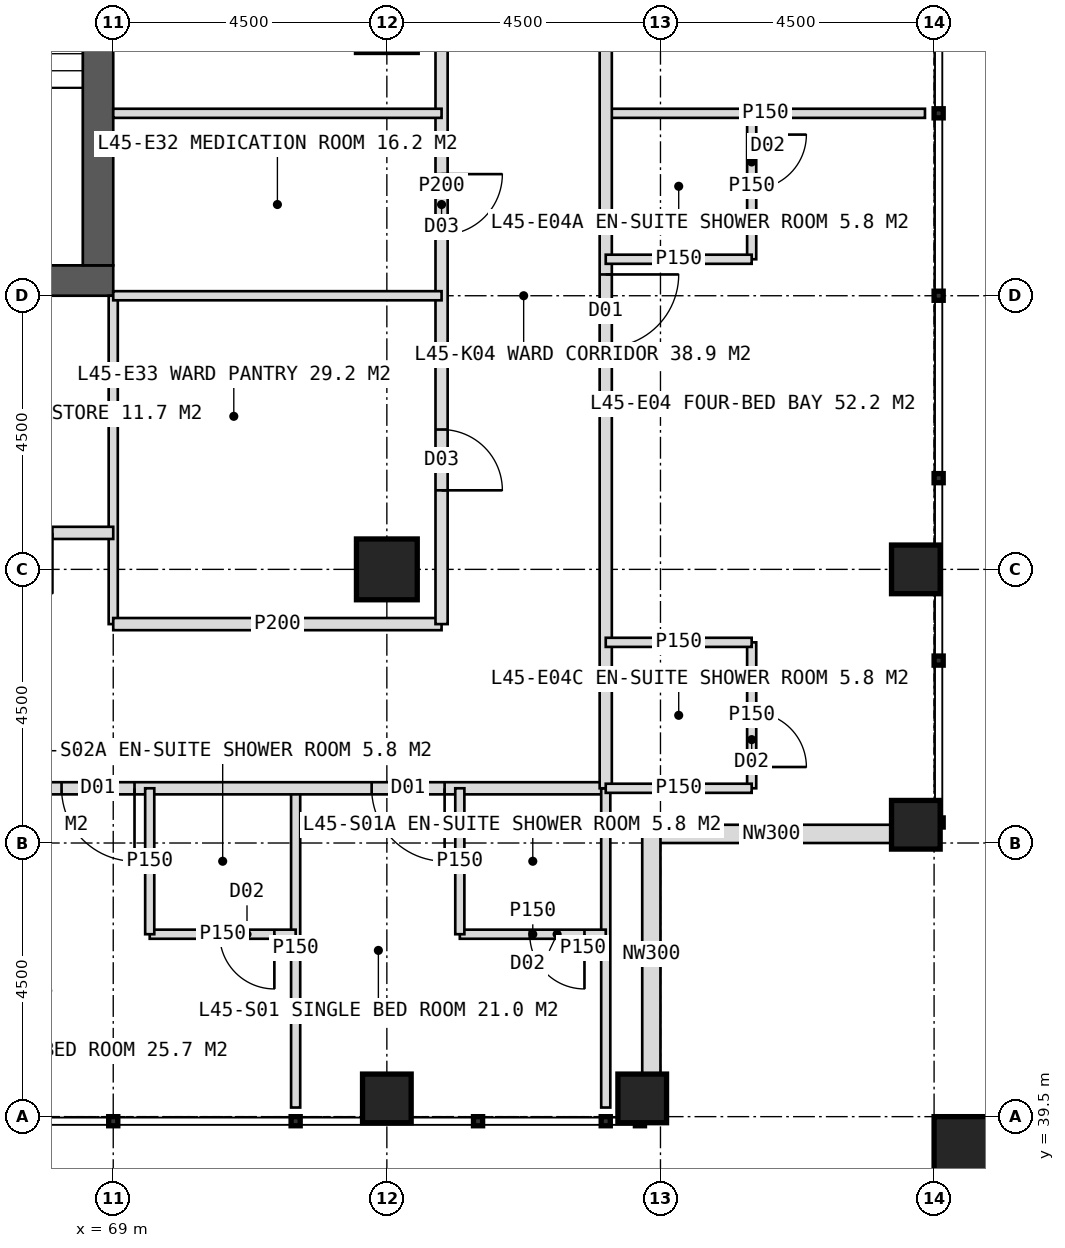
"""IFC4 building model, lengths in metres.
Left out: names, types, materials, properties, quantities, classifications, styles, units other than length and angle.
Written with IfcOpenShell. Run it as: python <this file> out.ifc"""

import sys

from ifc_helpers import new_model, si_unit, direction, frame, frame_2d, origin, origin_2d, place, context, subcontext, project, spatial, rectangle, hollow_rectangle, extrude, element, fill, save


model = new_model("IFC4")
c1 = context("Model", 3, precision=1e-05, world=origin(), true_north=direction((0.0, 1.0)))
c2 = subcontext(c1, "Body", "Model", "MODEL_VIEW")
j1 = project(units=[si_unit("LENGTHUNIT", "METRE"), si_unit("PLANEANGLEUNIT", "RADIAN")], contexts=[c1])
p1 = place(None, origin())
s1 = spatial("IfcSite", under=j1, at=p1, CompositionType="ELEMENT")
p2 = place(p1, origin())
s2 = spatial("IfcBuilding", under=s1, at=p2, CompositionType="ELEMENT")
p3 = place(p2, frame((0.0, 0.0, 189.0)))
s3 = spatial("IfcBuildingStorey", under=s2, at=p3, CompositionType="ELEMENT", Elevation=189.0)
p4 = place(p3, frame((51.0, 53.25, 0.0), z_axis=(0.0, 0.0, 1.0), x_axis=(1.0, 0.0, 0.0)))
e1 = element("IfcWall", 1, at=p4, inside=s3, PredefinedType="SHEAR", context=c2, shape_type="SweptSolid", body=[
    extrude(rectangle(XDim=18.0, YDim=0.5, at=frame_2d((9.0, 0.0))), origin(), (0.0, 0.0, 1.0), 4.0),
])
p5 = place(p4, frame((8.1, 0.0, 0.0)))
e2 = element("IfcOpeningElement", 2, at=p5, cuts=e1, PredefinedType="OPENING", context=c2, shape_type="SweptSolid", body=[
    extrude(rectangle(XDim=1.8, YDim=2.2, at=frame_2d((0.9, 1.1))), frame((0.0, 0.26, 0.0), z_axis=(0.0, -1.0, 0.0), x_axis=(1.0, 0.0, 0.0)), (0.0, 0.0, 1.0), 0.52),
])
p6 = place(p3, frame((68.75, 53.5, 0.0), z_axis=(0.0, 0.0, 1.0), x_axis=(0.0, 1.0, 0.0)))
e3 = element("IfcWall", 3, at=p6, inside=s3, PredefinedType="SHEAR", context=c2, shape_type="SweptSolid", body=[
    extrude(rectangle(XDim=17.0, YDim=0.5, at=frame_2d((8.5, 0.0))), origin(), (0.0, 0.0, 1.0), 4.0),
])
p7 = place(p6, frame((9.6, 0.0, 0.0)))
e4 = element("IfcOpeningElement", 4, at=p7, cuts=e3, PredefinedType="OPENING", context=c2, shape_type="SweptSolid", body=[
    extrude(rectangle(XDim=1.5, YDim=2.2, at=frame_2d((0.75, 1.1))), frame((0.0, 0.26, 0.0), z_axis=(0.0, -1.0, 0.0), x_axis=(1.0, 0.0, 0.0)), (0.0, 0.0, 1.0), 0.52),
])
p8 = place(p3, frame((73.5, 48.5, 0.0), z_axis=(0.0, 0.0, 1.0), x_axis=(1.0, 0.0, 0.0)))
e5 = element("IfcColumn", 5, at=p8, inside=s3, PredefinedType="COLUMN", context=c2, shape_type="SweptSolid", body=[
    extrude(hollow_rectangle(XDim=1.0, YDim=1.0, WallThickness=0.1, at=origin_2d()), origin(), (0.0, 0.0, 1.0), 4.0),
])
for number, where, z_axis, x_axis in (
    (6, (82.2, 44.3, 0.0), (0.0, 0.0, 1.0), (1.0, 0.0, 0.0)),
    (7, (82.2, 48.5, 0.0), (0.0, 0.0, 1.0), (1.0, 0.0, 0.0)),
    (8, (73.5, 39.8, 0.0), (0.0, 0.0, 1.0), (1.0, 0.0, 0.0)),
    (9, (77.7, 39.8, 0.0), (0.0, 0.0, 1.0), (1.0, 0.0, 0.0)),
):
    element("IfcColumn", number, at=place(p3, frame(where, z_axis=z_axis, x_axis=x_axis)), inside=s3, PredefinedType="COLUMN", context=c2, shape_type="SweptSolid", body=[
        extrude(hollow_rectangle(XDim=0.8, YDim=0.8, WallThickness=0.08, at=origin_2d()), origin(), (0.0, 0.0, 1.0), 4.0),
    ])
p9 = place(p3, frame((83.1, 38.9, 0.0), z_axis=(0.0, 0.0, 1.0), x_axis=(1.0, 0.0, 0.0)))
e10 = element("IfcColumn", 10, at=p9, inside=s3, PredefinedType="COLUMN", context=c2, shape_type="SweptSolid", body=[
    extrude(hollow_rectangle(XDim=1.2, YDim=1.2, WallThickness=0.07, at=origin_2d()), origin(), (0.0, 0.0, 1.0), 4.0),
])
for number, where, z_axis, x_axis in (
    (11, (81.8, 44.15, 0.0), (0.0, 0.0, 1.0), (-1.0, 0.0, 0.0)),
    (12, (77.85, 44.15, 0.0), (0.0, 0.0, 1.0), (0.0, -1.0, 0.0)),
):
    element("IfcWall", number, at=place(p3, frame(where, z_axis=z_axis, x_axis=x_axis)), inside=s3, PredefinedType="ELEMENTEDWALL", context=c2, shape_type="SweptSolid", body=[
        extrude(rectangle(XDim=3.95, YDim=0.3, at=frame_2d((1.975, 0.0))), origin(), (0.0, 0.0, 1.0), 2.85),
    ])
p10 = place(p3, frame((72.0, 44.9, 0.0), z_axis=(0.0, 0.0, 1.0), x_axis=(0.0, -1.0, 0.0)))
e13 = element("IfcWall", 13, at=p10, inside=s3, PredefinedType="PARTITIONING", context=c2, shape_type="SweptSolid", body=[
    extrude(rectangle(XDim=5.25, YDim=0.15, at=frame_2d((2.625, 0.0))), origin(), (0.0, 0.0, 1.0), 3.75),
])
p11 = place(p3, frame((77.1, 44.9, 0.0), z_axis=(0.0, 0.0, 1.0), x_axis=(-1.0, 0.0, 0.0)))
e14 = element("IfcWall", 14, at=p11, inside=s3, PredefinedType="PARTITIONING", context=c2, shape_type="SweptSolid", body=[
    extrude(rectangle(XDim=34.2, YDim=0.2, at=frame_2d((17.1, 0.0))), origin(), (0.0, 0.0, 1.0), 3.75),
])
p12 = place(p11, frame((2.65, 0.0, 0.0)))
e15 = element("IfcOpeningElement", 15, at=p12, cuts=e14, PredefinedType="OPENING", context=c2, shape_type="SweptSolid", body=[
    extrude(rectangle(XDim=1.2, YDim=2.2, at=frame_2d((0.6, 1.1))), frame((0.0, 0.11, 0.0), z_axis=(0.0, -1.0, 0.0), x_axis=(1.0, 0.0, 0.0)), (0.0, 0.0, 1.0), 0.22),
])
p13 = place(p11, frame((7.75, 0.0, 0.0)))
e16 = element("IfcOpeningElement", 16, at=p13, cuts=e14, PredefinedType="OPENING", context=c2, shape_type="SweptSolid", body=[
    extrude(rectangle(XDim=1.2, YDim=2.2, at=frame_2d((0.6, 1.1))), frame((0.0, 0.11, 0.0), z_axis=(0.0, -1.0, 0.0), x_axis=(1.0, 0.0, 0.0)), (0.0, 0.0, 1.0), 0.22),
])
p14 = place(p11, frame((13.75, 0.0, 0.0)))
e17 = element("IfcOpeningElement", 17, at=p14, cuts=e14, PredefinedType="OPENING", context=c2, shape_type="SweptSolid", body=[
    extrude(rectangle(XDim=1.2, YDim=2.2, at=frame_2d((0.6, 1.1))), frame((0.0, 0.11, 0.0), z_axis=(0.0, -1.0, 0.0), x_axis=(1.0, 0.0, 0.0)), (0.0, 0.0, 1.0), 0.22),
])
p15 = place(p11, frame((19.75, 0.0, 0.0)))
e18 = element("IfcOpeningElement", 18, at=p15, cuts=e14, PredefinedType="OPENING", context=c2, shape_type="SweptSolid", body=[
    extrude(rectangle(XDim=1.2, YDim=2.2, at=frame_2d((0.6, 1.1))), frame((0.0, 0.11, 0.0), z_axis=(0.0, -1.0, 0.0), x_axis=(1.0, 0.0, 0.0)), (0.0, 0.0, 1.0), 0.22),
])
p16 = place(p11, frame((25.75, 0.0, 0.0)))
e19 = element("IfcOpeningElement", 19, at=p16, cuts=e14, PredefinedType="OPENING", context=c2, shape_type="SweptSolid", body=[
    extrude(rectangle(XDim=1.2, YDim=2.2, at=frame_2d((0.6, 1.1))), frame((0.0, 0.11, 0.0), z_axis=(0.0, -1.0, 0.0), x_axis=(1.0, 0.0, 0.0)), (0.0, 0.0, 1.0), 0.22),
])
p17 = place(p3, frame((77.1, 44.9, 0.0), z_axis=(0.0, 0.0, 1.0), x_axis=(0.0, -1.0, 0.0)))
e20 = element("IfcWall", 20, at=p17, inside=s3, PredefinedType="PARTITIONING", context=c2, shape_type="SweptSolid", body=[
    extrude(rectangle(XDim=5.25, YDim=0.15, at=frame_2d((2.625, 0.0))), origin(), (0.0, 0.0, 1.0), 3.75),
])
p18 = place(p3, frame((77.1, 42.5, 0.0), z_axis=(0.0, 0.0, 1.0), x_axis=(-1.0, 0.0, 0.0)))
e21 = element("IfcWall", 21, at=p18, inside=s3, PredefinedType="PARTITIONING", context=c2, shape_type="SweptSolid", body=[
    extrude(rectangle(XDim=2.4, YDim=0.15, at=frame_2d((1.2, 0.0))), origin(), (0.0, 0.0, 1.0), 3.75),
])
p19 = place(p18, frame((0.35, 0.0, 0.0)))
e22 = element("IfcOpeningElement", 22, at=p19, cuts=e21, PredefinedType="OPENING", context=c2, shape_type="SweptSolid", body=[
    extrude(rectangle(XDim=0.9, YDim=2.1, at=frame_2d((0.45, 1.05))), frame((0.0, 0.085, 0.0), z_axis=(0.0, -1.0, 0.0), x_axis=(1.0, 0.0, 0.0)), (0.0, 0.0, 1.0), 0.17),
])
p20 = place(p3, frame((74.7, 44.9, 0.0), z_axis=(0.0, 0.0, 1.0), x_axis=(0.0, -1.0, 0.0)))
e23 = element("IfcWall", 23, at=p20, inside=s3, PredefinedType="PARTITIONING", context=c2, shape_type="SweptSolid", body=[
    extrude(rectangle(XDim=2.4, YDim=0.15, at=frame_2d((1.2, 0.0))), origin(), (0.0, 0.0, 1.0), 3.75),
])
p21 = place(p3, frame((72.0, 42.5, 0.0), z_axis=(0.0, 0.0, 1.0), x_axis=(-1.0, 0.0, 0.0)))
e24 = element("IfcWall", 24, at=p21, inside=s3, PredefinedType="PARTITIONING", context=c2, shape_type="SweptSolid", body=[
    extrude(rectangle(XDim=2.4, YDim=0.15, at=frame_2d((1.2, 0.0))), origin(), (0.0, 0.0, 1.0), 3.75),
])
p22 = place(p21, frame((0.35, 0.0, 0.0)))
e25 = element("IfcOpeningElement", 25, at=p22, cuts=e24, PredefinedType="OPENING", context=c2, shape_type="SweptSolid", body=[
    extrude(rectangle(XDim=0.9, YDim=2.1, at=frame_2d((0.45, 1.05))), frame((0.0, 0.085, 0.0), z_axis=(0.0, -1.0, 0.0), x_axis=(1.0, 0.0, 0.0)), (0.0, 0.0, 1.0), 0.17),
])
p23 = place(p3, frame((69.6, 44.9, 0.0), z_axis=(0.0, 0.0, 1.0), x_axis=(0.0, -1.0, 0.0)))
e26 = element("IfcWall", 26, at=p23, inside=s3, PredefinedType="PARTITIONING", context=c2, shape_type="SweptSolid", body=[
    extrude(rectangle(XDim=2.4, YDim=0.15, at=frame_2d((1.2, 0.0))), origin(), (0.0, 0.0, 1.0), 3.75),
])
p24 = place(p3, frame((69.0, 53.0, 0.0), z_axis=(0.0, 0.0, 1.0), x_axis=(0.0, -1.0, 0.0)))
e27 = element("IfcWall", 27, at=p24, inside=s3, PredefinedType="PARTITIONING", context=c2, shape_type="SweptSolid", body=[
    extrude(rectangle(XDim=5.4, YDim=0.15, at=frame_2d((2.7, 0.0))), origin(), (0.0, 0.0, 1.0), 3.75),
])
p25 = place(p3, frame((74.4, 47.6, 0.0), z_axis=(0.0, 0.0, 1.0), x_axis=(-1.0, 0.0, 0.0)))
e28 = element("IfcWall", 28, at=p25, inside=s3, PredefinedType="PARTITIONING", context=c2, shape_type="SweptSolid", body=[
    extrude(rectangle(XDim=5.4, YDim=0.2, at=frame_2d((2.7, 0.0))), origin(), (0.0, 0.0, 1.0), 3.75),
])
p26 = place(p3, frame((69.0, 49.1, 0.0), z_axis=(0.0, 0.0, 1.0), x_axis=(-1.0, 0.0, 0.0)))
e29 = element("IfcWall", 29, at=p26, inside=s3, PredefinedType="PARTITIONING", context=c2, shape_type="SweptSolid", body=[
    extrude(rectangle(XDim=6.75, YDim=0.2, at=frame_2d((3.375, 0.0))), origin(), (0.0, 0.0, 1.0), 3.75),
])
p27 = place(p26, frame((1.0, 0.0, 0.0)))
e30 = element("IfcOpeningElement", 30, at=p27, cuts=e29, PredefinedType="OPENING", context=c2, shape_type="SweptSolid", body=[
    extrude(rectangle(XDim=1.0, YDim=2.1, at=frame_2d((0.5, 1.05))), frame((0.0, 0.11, 0.0), z_axis=(0.0, -1.0, 0.0), x_axis=(1.0, 0.0, 0.0)), (0.0, 0.0, 1.0), 0.22),
])
p28 = place(p26, frame((5.425, 0.0, 0.0)))
e31 = element("IfcOpeningElement", 31, at=p28, cuts=e29, PredefinedType="OPENING", context=c2, shape_type="SweptSolid", body=[
    extrude(rectangle(XDim=1.0, YDim=2.1, at=frame_2d((0.5, 1.05))), frame((0.0, 0.11, 0.0), z_axis=(0.0, -1.0, 0.0), x_axis=(1.0, 0.0, 0.0)), (0.0, 0.0, 1.0), 0.22),
])
p29 = place(p3, frame((77.1, 56.0, 0.0), z_axis=(0.0, 0.0, 1.0), x_axis=(1.0, 0.0, 0.0)))
e32 = element("IfcWall", 32, at=p29, inside=s3, PredefinedType="PARTITIONING", context=c2, shape_type="SweptSolid", body=[
    extrude(rectangle(XDim=5.25, YDim=0.15, at=frame_2d((2.625, 0.0))), origin(), (0.0, 0.0, 1.0), 3.75),
])
p30 = place(p3, frame((77.1, 79.1, 0.0), z_axis=(0.0, 0.0, 1.0), x_axis=(0.0, -1.0, 0.0)))
e33 = element("IfcWall", 33, at=p30, inside=s3, PredefinedType="PARTITIONING", context=c2, shape_type="SweptSolid", body=[
    extrude(rectangle(XDim=34.2, YDim=0.2, at=frame_2d((17.1, 0.0))), origin(), (0.0, 0.0, 1.0), 3.75),
])
p31 = place(p30, frame((3.25, 0.0, 0.0)))
e34 = element("IfcOpeningElement", 34, at=p31, cuts=e33, PredefinedType="OPENING", context=c2, shape_type="SweptSolid", body=[
    extrude(rectangle(XDim=1.2, YDim=2.2, at=frame_2d((0.6, 1.1))), frame((0.0, 0.11, 0.0), z_axis=(0.0, -1.0, 0.0), x_axis=(1.0, 0.0, 0.0)), (0.0, 0.0, 1.0), 0.22),
])
p32 = place(p30, frame((11.35, 0.0, 0.0)))
e35 = element("IfcOpeningElement", 35, at=p32, cuts=e33, PredefinedType="OPENING", context=c2, shape_type="SweptSolid", body=[
    extrude(rectangle(XDim=1.2, YDim=2.2, at=frame_2d((0.6, 1.1))), frame((0.0, 0.11, 0.0), z_axis=(0.0, -1.0, 0.0), x_axis=(1.0, 0.0, 0.0)), (0.0, 0.0, 1.0), 0.22),
])
p33 = place(p30, frame((19.75, 0.0, 0.0)))
e36 = element("IfcOpeningElement", 36, at=p33, cuts=e33, PredefinedType="OPENING", context=c2, shape_type="SweptSolid", body=[
    extrude(rectangle(XDim=1.2, YDim=2.2, at=frame_2d((0.6, 1.1))), frame((0.0, 0.11, 0.0), z_axis=(0.0, -1.0, 0.0), x_axis=(1.0, 0.0, 0.0)), (0.0, 0.0, 1.0), 0.22),
])
p34 = place(p30, frame((25.75, 0.0, 0.0)))
e37 = element("IfcOpeningElement", 37, at=p34, cuts=e33, PredefinedType="OPENING", context=c2, shape_type="SweptSolid", body=[
    extrude(rectangle(XDim=1.2, YDim=2.2, at=frame_2d((0.6, 1.1))), frame((0.0, 0.11, 0.0), z_axis=(0.0, -1.0, 0.0), x_axis=(1.0, 0.0, 0.0)), (0.0, 0.0, 1.0), 0.22),
])
p35 = place(p3, frame((79.5, 56.0, 0.0), z_axis=(0.0, 0.0, 1.0), x_axis=(0.0, -1.0, 0.0)))
e38 = element("IfcWall", 38, at=p35, inside=s3, PredefinedType="PARTITIONING", context=c2, shape_type="SweptSolid", body=[
    extrude(rectangle(XDim=2.4, YDim=0.15, at=frame_2d((1.2, 0.0))), origin(), (0.0, 0.0, 1.0), 3.75),
])
p36 = place(p35, frame((0.35, 0.0, 0.0)))
e39 = element("IfcOpeningElement", 39, at=p36, cuts=e38, PredefinedType="OPENING", context=c2, shape_type="SweptSolid", body=[
    extrude(rectangle(XDim=0.9, YDim=2.1, at=frame_2d((0.45, 1.05))), frame((0.0, 0.085, 0.0), z_axis=(0.0, -1.0, 0.0), x_axis=(1.0, 0.0, 0.0)), (0.0, 0.0, 1.0), 0.17),
])
p37 = place(p3, frame((77.1, 53.6, 0.0), z_axis=(0.0, 0.0, 1.0), x_axis=(1.0, 0.0, 0.0)))
e40 = element("IfcWall", 40, at=p37, inside=s3, PredefinedType="PARTITIONING", context=c2, shape_type="SweptSolid", body=[
    extrude(rectangle(XDim=2.4, YDim=0.15, at=frame_2d((1.2, 0.0))), origin(), (0.0, 0.0, 1.0), 3.75),
])
p38 = place(p3, frame((79.5, 47.3, 0.0), z_axis=(0.0, 0.0, 1.0), x_axis=(0.0, -1.0, 0.0)))
e41 = element("IfcWall", 41, at=p38, inside=s3, PredefinedType="PARTITIONING", context=c2, shape_type="SweptSolid", body=[
    extrude(rectangle(XDim=2.4, YDim=0.15, at=frame_2d((1.2, 0.0))), origin(), (0.0, 0.0, 1.0), 3.75),
])
p39 = place(p38, frame((1.15, 0.0, 0.0)))
e42 = element("IfcOpeningElement", 42, at=p39, cuts=e41, PredefinedType="OPENING", context=c2, shape_type="SweptSolid", body=[
    extrude(rectangle(XDim=0.9, YDim=2.1, at=frame_2d((0.45, 1.05))), frame((0.0, 0.085, 0.0), z_axis=(0.0, -1.0, 0.0), x_axis=(1.0, 0.0, 0.0)), (0.0, 0.0, 1.0), 0.17),
])
for number, where, z_axis, x_axis in (
    (43, (77.1, 47.3, 0.0), (0.0, 0.0, 1.0), (1.0, 0.0, 0.0)),
    (44, (77.1, 44.9, 0.0), (0.0, 0.0, 1.0), (1.0, 0.0, 0.0)),
):
    element("IfcWall", number, at=place(p3, frame(where, z_axis=z_axis, x_axis=x_axis)), inside=s3, PredefinedType="PARTITIONING", context=c2, shape_type="SweptSolid", body=[
        extrude(rectangle(XDim=2.4, YDim=0.15, at=frame_2d((1.2, 0.0))), origin(), (0.0, 0.0, 1.0), 3.75),
    ])
p40 = place(p3, frame((74.4, 62.0, 0.0), z_axis=(0.0, 0.0, 1.0), x_axis=(0.0, -1.0, 0.0)))
e45 = element("IfcWall", 45, at=p40, inside=s3, PredefinedType="PARTITIONING", context=c2, shape_type="SweptSolid", body=[
    extrude(rectangle(XDim=14.4, YDim=0.2, at=frame_2d((7.2, 0.0))), origin(), (0.0, 0.0, 1.0), 3.75),
])
p41 = place(p40, frame((2.5, 0.0, 0.0)))
e46 = element("IfcOpeningElement", 46, at=p41, cuts=e45, PredefinedType="OPENING", context=c2, shape_type="SweptSolid", body=[
    extrude(rectangle(XDim=1.0, YDim=2.1, at=frame_2d((0.5, 1.05))), frame((0.0, 0.11, 0.0), z_axis=(0.0, -1.0, 0.0), x_axis=(1.0, 0.0, 0.0)), (0.0, 0.0, 1.0), 0.22),
])
p42 = place(p40, frame((7.0, 0.0, 0.0)))
e47 = element("IfcOpeningElement", 47, at=p42, cuts=e45, PredefinedType="OPENING", context=c2, shape_type="SweptSolid", body=[
    extrude(rectangle(XDim=1.0, YDim=2.1, at=frame_2d((0.5, 1.05))), frame((0.0, 0.11, 0.0), z_axis=(0.0, -1.0, 0.0), x_axis=(1.0, 0.0, 0.0)), (0.0, 0.0, 1.0), 0.22),
])
p43 = place(p40, frame((11.2, 0.0, 0.0)))
e48 = element("IfcOpeningElement", 48, at=p43, cuts=e45, PredefinedType="OPENING", context=c2, shape_type="SweptSolid", body=[
    extrude(rectangle(XDim=1.0, YDim=2.1, at=frame_2d((0.5, 1.05))), frame((0.0, 0.11, 0.0), z_axis=(0.0, -1.0, 0.0), x_axis=(1.0, 0.0, 0.0)), (0.0, 0.0, 1.0), 0.22),
])
for number, where, z_axis, x_axis in (
    (49, (69.0, 56.0, 0.0), (0.0, 0.0, 1.0), (1.0, 0.0, 0.0)),
    (50, (69.0, 53.0, 0.0), (0.0, 0.0, 1.0), (1.0, 0.0, 0.0)),
):
    element("IfcWall", number, at=place(p3, frame(where, z_axis=z_axis, x_axis=x_axis)), inside=s3, PredefinedType="PARTITIONING", context=c2, shape_type="SweptSolid", body=[
        extrude(rectangle(XDim=5.4, YDim=0.15, at=frame_2d((2.7, 0.0))), origin(), (0.0, 0.0, 1.0), 3.75),
    ])
p44 = place(p12, origin())
e51 = element("IfcDoor", 51, at=p44, inside=s3, OperationType="SINGLE_SWING_LEFT", PredefinedType="DOOR", context=c2, shape_type="SweptSolid", body=[
    extrude(rectangle(XDim=1.2, YDim=2.2, at=frame_2d((0.6, 1.1))), frame((0.0, 0.025, 0.0), z_axis=(0.0, -1.0, 0.0), x_axis=(1.0, 0.0, 0.0)), (0.0, 0.0, 1.0), 0.05),
])
fill(e15, e51)
p45 = place(p19, origin())
e52 = element("IfcDoor", 52, at=p45, inside=s3, OperationType="SINGLE_SWING_LEFT", PredefinedType="DOOR", context=c2, shape_type="SweptSolid", body=[
    extrude(rectangle(XDim=0.9, YDim=2.1, at=frame_2d((0.45, 1.05))), frame((0.0, 0.025, 0.0), z_axis=(0.0, -1.0, 0.0), x_axis=(1.0, 0.0, 0.0)), (0.0, 0.0, 1.0), 0.05),
])
fill(e22, e52)
p46 = place(p13, origin())
e53 = element("IfcDoor", 53, at=p46, inside=s3, OperationType="SINGLE_SWING_LEFT", PredefinedType="DOOR", context=c2, shape_type="SweptSolid", body=[
    extrude(rectangle(XDim=1.2, YDim=2.2, at=frame_2d((0.6, 1.1))), frame((0.0, 0.025, 0.0), z_axis=(0.0, -1.0, 0.0), x_axis=(1.0, 0.0, 0.0)), (0.0, 0.0, 1.0), 0.05),
])
fill(e16, e53)
p47 = place(p22, origin())
e54 = element("IfcDoor", 54, at=p47, inside=s3, OperationType="SINGLE_SWING_LEFT", PredefinedType="DOOR", context=c2, shape_type="SweptSolid", body=[
    extrude(rectangle(XDim=0.9, YDim=2.1, at=frame_2d((0.45, 1.05))), frame((0.0, 0.025, 0.0), z_axis=(0.0, -1.0, 0.0), x_axis=(1.0, 0.0, 0.0)), (0.0, 0.0, 1.0), 0.05),
])
fill(e25, e54)
p48 = place(p34, origin())
e55 = element("IfcDoor", 55, at=p48, inside=s3, OperationType="SINGLE_SWING_LEFT", PredefinedType="DOOR", context=c2, shape_type="SweptSolid", body=[
    extrude(rectangle(XDim=1.2, YDim=2.2, at=frame_2d((0.6, 1.1))), frame((0.0, 0.025, 0.0), z_axis=(0.0, -1.0, 0.0), x_axis=(1.0, 0.0, 0.0)), (0.0, 0.0, 1.0), 0.05),
])
fill(e37, e55)
p49 = place(p36, origin())
e56 = element("IfcDoor", 56, at=p49, inside=s3, OperationType="SINGLE_SWING_LEFT", PredefinedType="DOOR", context=c2, shape_type="SweptSolid", body=[
    extrude(rectangle(XDim=0.9, YDim=2.1, at=frame_2d((0.45, 1.05))), frame((0.0, 0.025, 0.0), z_axis=(0.0, -1.0, 0.0), x_axis=(1.0, 0.0, 0.0)), (0.0, 0.0, 1.0), 0.05),
])
fill(e39, e56)
p50 = place(p39, origin())
e57 = element("IfcDoor", 57, at=p50, inside=s3, OperationType="SINGLE_SWING_RIGHT", PredefinedType="DOOR", context=c2, shape_type="SweptSolid", body=[
    extrude(rectangle(XDim=0.9, YDim=2.1, at=frame_2d((0.45, 1.05))), frame((0.0, 0.025, 0.0), z_axis=(0.0, -1.0, 0.0), x_axis=(1.0, 0.0, 0.0)), (0.0, 0.0, 1.0), 0.05),
])
fill(e42, e57)
p51 = place(p42, origin())
e58 = element("IfcDoor", 58, at=p51, inside=s3, OperationType="SINGLE_SWING_LEFT", PredefinedType="DOOR", context=c2, shape_type="SweptSolid", body=[
    extrude(rectangle(XDim=1.0, YDim=2.1, at=frame_2d((0.5, 1.05))), frame((0.0, 0.025, 0.0), z_axis=(0.0, -1.0, 0.0), x_axis=(1.0, 0.0, 0.0)), (0.0, 0.0, 1.0), 0.05),
])
fill(e47, e58)
p52 = place(p43, origin())
e59 = element("IfcDoor", 59, at=p52, inside=s3, OperationType="SINGLE_SWING_RIGHT", PredefinedType="DOOR", context=c2, shape_type="SweptSolid", body=[
    extrude(rectangle(XDim=1.0, YDim=2.1, at=frame_2d((0.5, 1.05))), frame((0.0, 0.025, 0.0), z_axis=(0.0, -1.0, 0.0), x_axis=(1.0, 0.0, 0.0)), (0.0, 0.0, 1.0), 0.05),
])
fill(e48, e59)
save(model, sys.argv[1])
